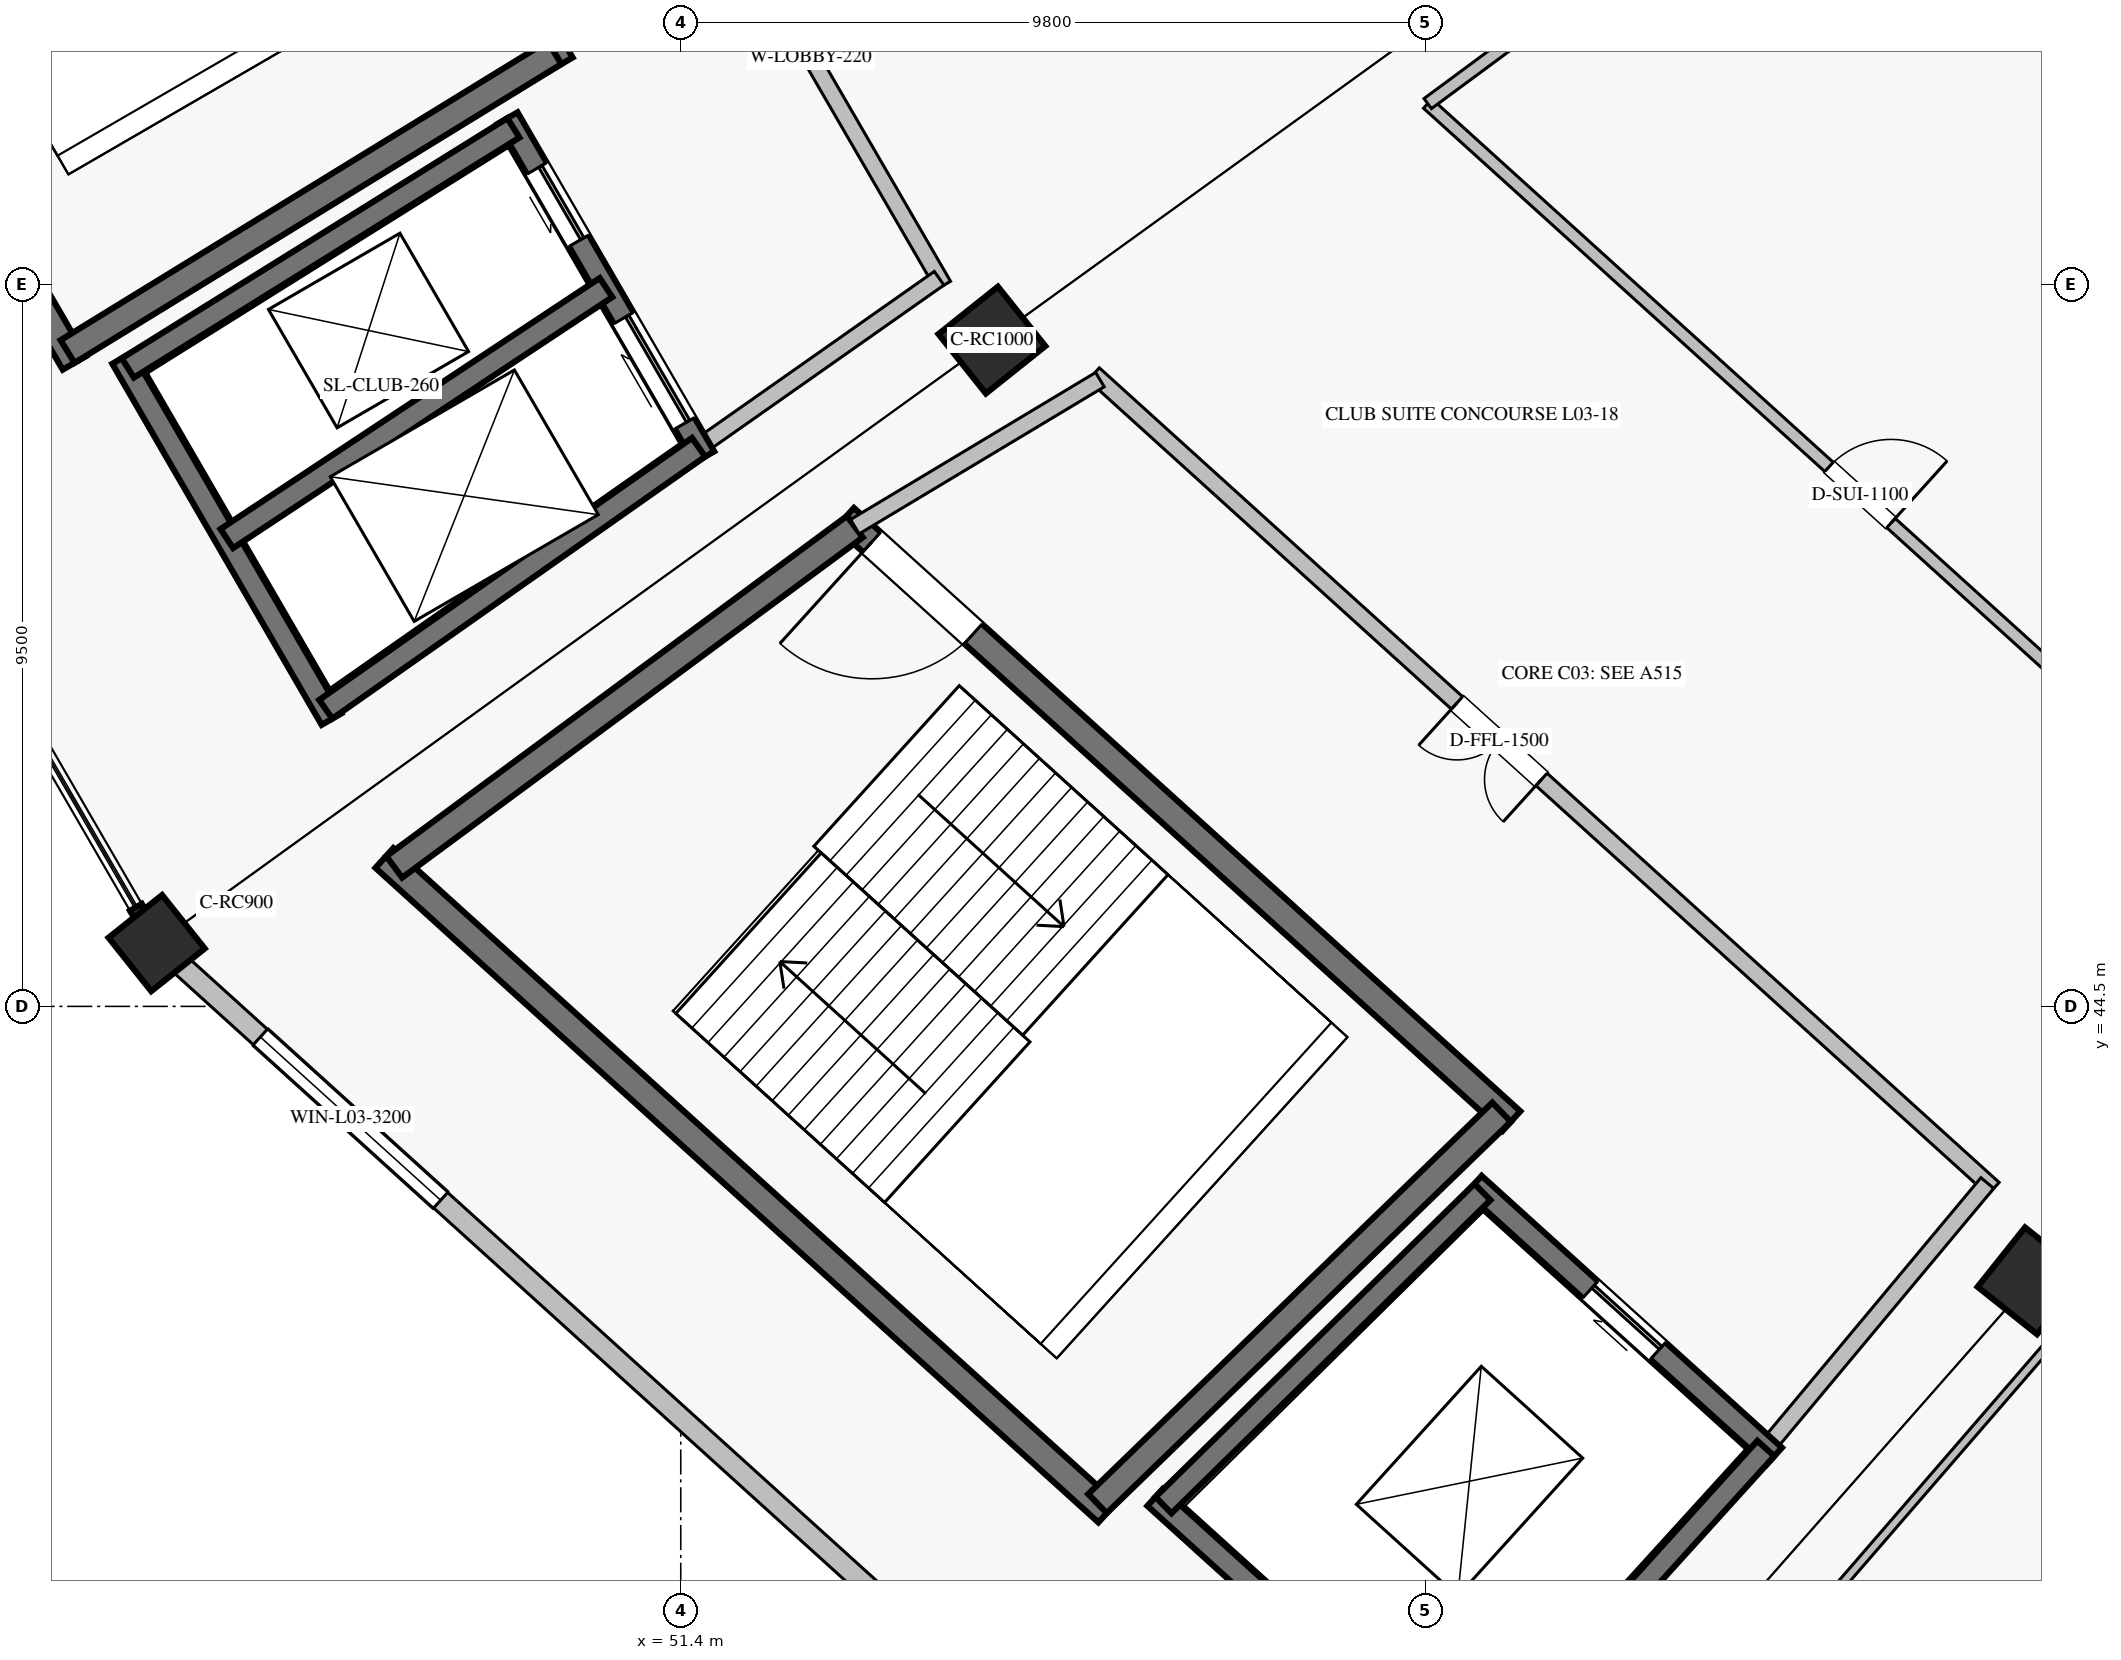
"""IFC4 building model, lengths in metres.
Left out: names, types, materials, properties, quantities, classifications, styles, units other than length and angle.
Written with IfcOpenShell. Run it as: python <this file> out.ifc"""

import sys

from ifc_helpers import new_model, si_unit, direction, frame, frame_2d, origin, origin_2d, place, context, subcontext, project, spatial, rectangle, extrude, element, fill, save


model = new_model("IFC4")
c1 = context("Model", 3, precision=1e-05, world=origin(), true_north=direction((0.0, 1.0)))
c2 = subcontext(c1, "Body", "Model", "MODEL_VIEW")
j1 = project(units=[si_unit("LENGTHUNIT", "METRE"), si_unit("PLANEANGLEUNIT", "RADIAN")], contexts=[c1])
p1 = place(None, origin())
s1 = spatial("IfcSite", under=j1, at=p1, CompositionType="ELEMENT")
p2 = place(p1, origin())
s2 = spatial("IfcBuilding", under=s1, at=p2, CompositionType="ELEMENT")
p3 = place(p2, frame((0.0, 0.0, 15.64)))
s3 = spatial("IfcBuildingStorey", under=s2, at=p3, CompositionType="ELEMENT", Elevation=15.64)
for number, where, z_axis, x_axis in (
    (1, (55.494, 53.266, 0.0), (0.0, 0.0, 1.0), (-0.782, -0.623, 0.0)),
    (2, (69.166, 40.889, 0.0), (0.0, 0.0, 1.0), (-0.623, -0.782, 0.0)),
):
    element("IfcColumn", number, at=place(p3, frame(where, z_axis=z_axis, x_axis=x_axis)), inside=s3, PredefinedType="COLUMN", context=c2, shape_type="SweptSolid", body=[
        extrude(rectangle(XDim=1.0, YDim=1.0, at=origin_2d()), origin(), (0.0, 0.0, 1.0), 4.76),
    ])
p4 = place(p3, frame((44.505, 45.332, 0.0), z_axis=(0.0, 0.0, 1.0), x_axis=(-0.781831482473, -0.623489801853, 0.0)))
e3 = element("IfcColumn", 3, at=p4, inside=s3, PredefinedType="COLUMN", context=c2, shape_type="SweptSolid", body=[
    extrude(rectangle(XDim=0.9, YDim=0.9, at=origin_2d()), origin(), (0.0, 0.0, 1.0), 4.76),
])
p5 = place(p3, frame((44.831, 45.037, 0.0), z_axis=(0.0, 0.0, 1.0), x_axis=(0.741352367697, -0.671115986183, 0.0)))
e4 = element("IfcWall", 4, at=p5, inside=s3, PredefinedType="SOLIDWALL", context=c2, shape_type="SweptSolid", body=[
    extrude(rectangle(XDim=20.564, YDim=0.275, at=frame_2d((10.282, 0.0))), origin(), (0.0, 0.0, 1.0), 3.81),
])
p6 = place(p5, frame((1.4, 0.0, 1.0)))
e5 = element("IfcOpeningElement", 5, at=p6, cuts=e4, PredefinedType="OPENING", context=c2, shape_type="SweptSolid", body=[
    extrude(rectangle(XDim=3.2, YDim=2.2, at=frame_2d((1.6, 1.1))), frame((0.0, 0.147, 0.0), z_axis=(0.0, -1.0, 0.0), x_axis=(1.0, 0.0, 0.0)), (0.0, 0.0, 1.0), 0.295),
])
p7 = place(p3, frame((44.09, 66.788, 0.0), z_axis=(0.0, 0.0, 1.0), x_axis=(0.501628624814, -0.865083072755, 0.0)))
e6 = element("IfcWall", 6, at=p7, inside=s3, PredefinedType="SHEAR", context=c2, shape_type="SweptSolid", body=[
    extrude(rectangle(XDim=11.435, YDim=0.35, at=frame_2d((5.718, 0.0))), origin(), (0.0, 0.0, 1.0), 4.46),
])
p8 = place(p7, frame((0.475, 0.0, 0.0)))
e7 = element("IfcOpeningElement", 7, at=p8, cuts=e6, PredefinedType="OPENING", context=c2, shape_type="SweptSolid", body=[
    extrude(rectangle(XDim=1.8, YDim=2.2, at=frame_2d((0.9, 1.1))), frame((0.0, 0.185, 0.0), z_axis=(0.0, -1.0, 0.0), x_axis=(1.0, 0.0, 0.0)), (0.0, 0.0, 1.0), 0.37),
])
p9 = place(p3, frame((37.198, 63.695, 0.0), z_axis=(0.0, 0.0, 1.0), x_axis=(0.501601740165, -0.865098661577, 0.0)))
e8 = element("IfcWall", 8, at=p9, inside=s3, PredefinedType="SHEAR", context=c2, shape_type="SweptSolid", body=[
    extrude(rectangle(XDim=12.405, YDim=0.35, at=frame_2d((6.202, 0.0))), origin(), (0.0, 0.0, 1.0), 4.46),
])
p10 = place(p3, frame((49.739, 57.046, 0.0), z_axis=(0.0, 0.0, 1.0), x_axis=(-0.852334575619, -0.522996913188, 0.0)))
e9 = element("IfcWall", 9, at=p10, inside=s3, PredefinedType="SHEAR", context=c2, shape_type="SweptSolid", body=[
    extrude(rectangle(XDim=7.516, YDim=0.35, at=frame_2d((3.758, 0.0))), origin(), (0.0, 0.0, 1.0), 4.46),
])
p11 = place(p3, frame((49.123, 56.188, 0.0), z_axis=(0.0, 0.0, 1.0), x_axis=(0.501629534056, -0.86508254552, 0.0)))
e10 = element("IfcWall", 10, at=p11, inside=s3, PredefinedType="SHEAR", context=c2, shape_type="SweptSolid", body=[
    extrude(rectangle(XDim=5.157, YDim=0.3, at=frame_2d((2.579, 0.0))), origin(), (0.0, 0.0, 1.0), 4.46),
])
p12 = place(p11, frame((0.766, 0.0, 0.0)))
e11 = element("IfcOpeningElement", 11, at=p12, cuts=e10, PredefinedType="OPENING", context=c2, shape_type="SweptSolid", body=[
    extrude(rectangle(XDim=1.1, YDim=2.2, at=frame_2d((0.55, 1.1))), frame((0.0, 0.16, 0.0), z_axis=(0.0, -1.0, 0.0), x_axis=(1.0, 0.0, 0.0)), (0.0, 0.0, 1.0), 0.32),
])
p13 = place(p11, frame((3.042, 0.0, 0.0)))
e12 = element("IfcOpeningElement", 12, at=p13, cuts=e10, PredefinedType="OPENING", context=c2, shape_type="SweptSolid", body=[
    extrude(rectangle(XDim=1.6, YDim=2.3, at=frame_2d((0.8, 1.15))), frame((0.0, 0.16, 0.0), z_axis=(0.0, -1.0, 0.0), x_axis=(1.0, 0.0, 0.0)), (0.0, 0.0, 1.0), 0.32),
])
p14 = place(p3, frame((44.05, 53.03, 0.0), z_axis=(0.0, 0.0, 1.0), x_axis=(0.501596987756, -0.865101417103, 0.0)))
e13 = element("IfcWall", 13, at=p14, inside=s3, PredefinedType="SHEAR", context=c2, shape_type="SweptSolid", body=[
    extrude(rectangle(XDim=5.491, YDim=0.3, at=frame_2d((2.746, 0.0))), origin(), (0.0, 0.0, 1.0), 4.46),
])
p15 = place(p3, frame((49.198, 56.058, 0.0), z_axis=(0.0, 0.0, 1.0), x_axis=(-0.848938067893, -0.528492343257, 0.0)))
e14 = element("IfcWall", 14, at=p15, inside=s3, PredefinedType="SHEAR", context=c2, shape_type="SweptSolid", body=[
    extrude(rectangle(XDim=5.975, YDim=0.3, at=frame_2d((2.988, 0.0))), origin(), (0.0, 0.0, 1.0), 4.46),
])
p16 = place(p3, frame((51.635, 51.855, 0.0), z_axis=(0.0, 0.0, 1.0), x_axis=(-0.818205158105, -0.574926359851, 0.0)))
e15 = element("IfcWall", 15, at=p16, inside=s3, PredefinedType="SHEAR", context=c2, shape_type="SweptSolid", body=[
    extrude(rectangle(XDim=5.995, YDim=0.3, at=frame_2d((2.998, 0.0))), origin(), (0.0, 0.0, 1.0), 4.46),
])
p17 = place(p3, frame((50.417, 53.957, 0.0), z_axis=(0.0, 0.0, 1.0), x_axis=(-0.833878900042, -0.551947443209, 0.0)))
e16 = element("IfcWall", 16, at=p17, inside=s3, PredefinedType="SHEAR", context=c2, shape_type="SweptSolid", body=[
    extrude(rectangle(XDim=5.983, YDim=0.3, at=frame_2d((2.991, 0.0))), origin(), (0.0, 0.0, 1.0), 4.46),
])
p18 = place(p3, frame((46.774, 67.921, 0.0), z_axis=(0.0, 0.0, 1.0), x_axis=(0.501612626242, -0.865092349518, 0.0)))
e17 = element("IfcWall", 17, at=p18, inside=s3, PredefinedType="SOLIDWALL", context=c2, shape_type="SweptSolid", body=[
    extrude(rectangle(XDim=16.11, YDim=0.22, at=frame_2d((8.055, 0.0))), origin(), (0.0, 0.0, 1.0), 4.46),
])
p19 = place(p18, frame((6.511, 0.0, 0.0)))
e18 = element("IfcOpeningElement", 18, at=p19, cuts=e17, PredefinedType="OPENING", context=c2, shape_type="SweptSolid", body=[
    extrude(rectangle(XDim=1.5, YDim=2.2, at=frame_2d((0.75, 1.1))), frame((0.0, 0.12, 0.0), z_axis=(0.0, -1.0, 0.0), x_axis=(1.0, 0.0, 0.0)), (0.0, 0.0, 1.0), 0.24),
])
p20 = place(p3, frame((54.8, 54.079, 0.0), z_axis=(0.0, 0.0, 1.0), x_axis=(-0.818225400643, -0.574897550649, 0.0)))
e19 = element("IfcWall", 19, at=p20, inside=s3, PredefinedType="SOLIDWALL", context=c2, shape_type="SweptSolid", body=[
    extrude(rectangle(XDim=3.868, YDim=0.22, at=frame_2d((1.934, 0.0))), origin(), (0.0, 0.0, 1.0), 4.46),
])
p21 = place(p3, frame((53.561, 50.928, 0.0), z_axis=(0.0, 0.0, 1.0), x_axis=(0.741358227035, -0.671109513572, 0.0)))
e20 = element("IfcWall", 20, at=p21, inside=s3, PredefinedType="SHEAR", context=c2, shape_type="SweptSolid", body=[
    extrude(rectangle(XDim=11.827, YDim=0.35, at=frame_2d((5.913, 0.0))), origin(), (0.0, 0.0, 1.0), 4.46),
])
p22 = place(p21, frame((0.475, 0.0, 0.0)))
e21 = element("IfcOpeningElement", 21, at=p22, cuts=e20, PredefinedType="OPENING", context=c2, shape_type="SweptSolid", body=[
    extrude(rectangle(XDim=1.8, YDim=2.2, at=frame_2d((0.9, 1.1))), frame((0.0, 0.185, 0.0), z_axis=(0.0, -1.0, 0.0), x_axis=(1.0, 0.0, 0.0)), (0.0, 0.0, 1.0), 0.37),
])
p23 = place(p3, frame((47.501, 46.452, 0.0), z_axis=(0.0, 0.0, 1.0), x_axis=(0.741351373721, -0.671117084183, 0.0)))
e22 = element("IfcWall", 22, at=p23, inside=s3, PredefinedType="SHEAR", context=c2, shape_type="SweptSolid", body=[
    extrude(rectangle(XDim=12.83, YDim=0.35, at=frame_2d((6.415, 0.0))), origin(), (0.0, 0.0, 1.0), 4.46),
])
p24 = place(p3, frame((53.691, 50.811, 0.0), z_axis=(0.0, 0.0, 1.0), x_axis=(-0.804395625347, -0.594093997548, 0.0)))
e23 = element("IfcWall", 23, at=p24, inside=s3, PredefinedType="SHEAR", context=c2, shape_type="SweptSolid", body=[
    extrude(rectangle(XDim=7.534, YDim=0.35, at=frame_2d((3.767, 0.0))), origin(), (0.0, 0.0, 1.0), 4.46),
])
p25 = place(p3, frame((62.199, 43.108, 0.0), z_axis=(0.0, 0.0, 1.0), x_axis=(-0.718297398554, -0.69573619083, 0.0)))
e24 = element("IfcWall", 24, at=p25, inside=s3, PredefinedType="SHEAR", context=c2, shape_type="SweptSolid", body=[
    extrude(rectangle(XDim=7.402, YDim=0.35, at=frame_2d((3.701, 0.0))), origin(), (0.0, 0.0, 1.0), 4.46),
])
p26 = place(p3, frame((61.837, 42.159, 0.0), z_axis=(0.0, 0.0, 1.0), x_axis=(0.741350155641, -0.671118429736, 0.0)))
e25 = element("IfcWall", 25, at=p26, inside=s3, PredefinedType="SHEAR", context=c2, shape_type="SweptSolid", body=[
    extrude(rectangle(XDim=5.329, YDim=0.3, at=frame_2d((2.665, 0.0))), origin(), (0.0, 0.0, 1.0), 4.46),
])
p27 = place(p26, frame((2.065, 0.0, 0.0)))
e26 = element("IfcOpeningElement", 26, at=p27, cuts=e25, PredefinedType="OPENING", context=c2, shape_type="SweptSolid", body=[
    extrude(rectangle(XDim=1.2, YDim=2.2, at=frame_2d((0.6, 1.1))), frame((0.0, 0.16, 0.0), z_axis=(0.0, -1.0, 0.0), x_axis=(1.0, 0.0, 0.0)), (0.0, 0.0, 1.0), 0.32),
])
p28 = place(p3, frame((57.64, 38.039, 0.0), z_axis=(0.0, 0.0, 1.0), x_axis=(0.74134208775, -0.671127341815, 0.0)))
e27 = element("IfcWall", 27, at=p28, inside=s3, PredefinedType="SHEAR", context=c2, shape_type="SweptSolid", body=[
    extrude(rectangle(XDim=5.675, YDim=0.3, at=frame_2d((2.837, 0.0))), origin(), (0.0, 0.0, 1.0), 4.46),
])
p29 = place(p3, frame((61.948, 42.059, 0.0), z_axis=(0.0, 0.0, 1.0), x_axis=(-0.713553028001, -0.700601224828, 0.0)))
e28 = element("IfcWall", 28, at=p29, inside=s3, PredefinedType="SHEAR", context=c2, shape_type="SweptSolid", body=[
    extrude(rectangle(XDim=5.881, YDim=0.3, at=frame_2d((2.94, 0.0))), origin(), (0.0, 0.0, 1.0), 4.46),
])
p30 = place(p3, frame((65.676, 38.684, 0.0), z_axis=(0.0, 0.0, 1.0), x_axis=(-0.67115829282, -0.741314067031, 0.0)))
e29 = element("IfcWall", 29, at=p30, inside=s3, PredefinedType="SHEAR", context=c2, shape_type="SweptSolid", body=[
    extrude(rectangle(XDim=5.871, YDim=0.3, at=frame_2d((2.935, 0.0))), origin(), (0.0, 0.0, 1.0), 4.46),
])
p31 = place(p3, frame((56.834, 52.819, 0.0), z_axis=(0.0, 0.0, 1.0), x_axis=(0.741351035574, -0.671117457717, 0.0)))
e30 = element("IfcWall", 30, at=p31, inside=s3, PredefinedType="SOLIDWALL", context=c2, shape_type="SweptSolid", body=[
    extrude(rectangle(XDim=15.969, YDim=0.22, at=frame_2d((7.985, 0.0))), origin(), (0.0, 0.0, 1.0), 4.46),
])
p32 = place(p31, frame((6.447, 0.0, 0.0)))
e31 = element("IfcOpeningElement", 31, at=p32, cuts=e30, PredefinedType="OPENING", context=c2, shape_type="SweptSolid", body=[
    extrude(rectangle(XDim=1.5, YDim=2.2, at=frame_2d((0.75, 1.1))), frame((0.0, 0.12, 0.0), z_axis=(0.0, -1.0, 0.0), x_axis=(1.0, 0.0, 0.0)), (0.0, 0.0, 1.0), 0.24),
])
p33 = place(p3, frame((56.915, 52.746, 0.0), z_axis=(0.0, 0.0, 1.0), x_axis=(-0.857424171966, -0.514610327654, 0.0)))
e32 = element("IfcWall", 32, at=p33, inside=s3, PredefinedType="SOLIDWALL", context=c2, shape_type="SweptSolid", body=[
    extrude(rectangle(XDim=3.76, YDim=0.22, at=frame_2d((1.88, 0.0))), origin(), (0.0, 0.0, 1.0), 4.46),
])
p34 = place(p3, frame((68.591, 42.176, 0.0), z_axis=(0.0, 0.0, 1.0), x_axis=(-0.640759627034, -0.767741558315, 0.0)))
e33 = element("IfcWall", 33, at=p34, inside=s3, PredefinedType="SOLIDWALL", context=c2, shape_type="SweptSolid", body=[
    extrude(rectangle(XDim=4.549, YDim=0.22, at=frame_2d((2.274, 0.0))), origin(), (0.0, 0.0, 1.0), 4.46),
])
p35 = place(p3, frame((69.599, 40.28, 0.0), z_axis=(0.0, 0.0, 1.0), x_axis=(-0.654293035882, -0.756241114458, 0.0)))
e34 = element("IfcWall", 34, at=p35, inside=s3, PredefinedType="PARTITIONING", context=c2, shape_type="SweptSolid", body=[
    extrude(rectangle(XDim=12.091, YDim=0.115, at=frame_2d((6.045, 0.0))), origin(), (0.0, 0.0, 1.0), 3.78),
])
p36 = place(p3, frame((75.326, 37.559, 0.0), z_axis=(0.0, 0.0, 1.0), x_axis=(-0.594760374645, -0.803903039397, 0.0)))
e35 = element("IfcWall", 35, at=p36, inside=s3, PredefinedType="PARTITIONING", context=c2, shape_type="SweptSolid", body=[
    extrude(rectangle(XDim=11.875, YDim=0.1, at=frame_2d((5.938, 0.0))), origin(), (0.0, 0.0, 1.0), 3.78),
])
p37 = place(p3, frame((61.228, 56.377, 0.0), z_axis=(0.0, 0.0, 1.0), x_axis=(0.741351792112, -0.671116622006, 0.0)))
e36 = element("IfcWall", 36, at=p37, inside=s3, PredefinedType="PARTITIONING", context=c2, shape_type="SweptSolid", body=[
    extrude(rectangle(XDim=15.343, YDim=0.165, at=frame_2d((7.672, 0.0))), origin(), (0.0, 0.0, 1.0), 3.78),
])
p38 = place(p37, frame((7.122, 0.0, 0.0)))
e37 = element("IfcOpeningElement", 37, at=p38, cuts=e36, PredefinedType="OPENING", context=c2, shape_type="SweptSolid", body=[
    extrude(rectangle(XDim=1.1, YDim=2.25, at=frame_2d((0.55, 1.125))), frame((0.0, 0.093, 0.0), z_axis=(0.0, -1.0, 0.0), x_axis=(1.0, 0.0, 0.0)), (0.0, 0.0, 1.0), 0.185),
])
p39 = place(p3, frame((61.228, 56.377, 0.0), z_axis=(0.0, 0.0, 1.0), x_axis=(0.804403413526, 0.594083452309, 0.0)))
e38 = element("IfcWall", 38, at=p39, inside=s3, PredefinedType="PARTITIONING", context=c2, shape_type="SweptSolid", body=[
    extrude(rectangle(XDim=5.892, YDim=0.165, at=frame_2d((2.946, 0.0))), origin(), (0.0, 0.0, 1.0), 3.78),
])
p40 = place(p6, origin())
e39 = element("IfcWindow", 39, at=p40, inside=s3, PartitioningType="SINGLE_PANEL", PredefinedType="WINDOW", context=c2, shape_type="SweptSolid", body=[
    extrude(rectangle(XDim=3.2, YDim=2.2, at=frame_2d((1.6, 1.1))), frame((0.0, 0.03, 0.0), z_axis=(0.0, -1.0, 0.0), x_axis=(1.0, 0.0, 0.0)), (0.0, 0.0, 1.0), 0.06),
])
fill(e5, e39)
p41 = place(p12, origin())
e40 = element("IfcDoor", 40, at=p41, inside=s3, OperationType="SLIDING_TO_RIGHT", PredefinedType="DOOR", context=c2, shape_type="SweptSolid", body=[
    extrude(rectangle(XDim=1.1, YDim=2.2, at=frame_2d((0.55, 1.1))), frame((0.0, 0.025, 0.0), z_axis=(0.0, -1.0, 0.0), x_axis=(1.0, 0.0, 0.0)), (0.0, 0.0, 1.0), 0.05),
])
fill(e11, e40)
p42 = place(p13, origin())
e41 = element("IfcDoor", 41, at=p42, inside=s3, OperationType="SLIDING_TO_LEFT", PredefinedType="DOOR", context=c2, shape_type="SweptSolid", body=[
    extrude(rectangle(XDim=1.6, YDim=2.3, at=frame_2d((0.8, 1.15))), frame((0.0, 0.025, 0.0), z_axis=(0.0, -1.0, 0.0), x_axis=(1.0, 0.0, 0.0)), (0.0, 0.0, 1.0), 0.05),
])
fill(e12, e41)
p43 = place(p22, frame((1.8, 0.0, 0.0), z_axis=(0.0, 0.0, 1.0), x_axis=(-1.0, 0.0, 0.0)))
e42 = element("IfcDoor", 42, at=p43, inside=s3, OperationType="SINGLE_SWING_RIGHT", PredefinedType="DOOR", context=c2, shape_type="SweptSolid", body=[
    extrude(rectangle(XDim=1.8, YDim=2.2, at=frame_2d((0.9, 1.1))), frame((0.0, 0.025, 0.0), z_axis=(0.0, -1.0, 0.0), x_axis=(1.0, 0.0, 0.0)), (0.0, 0.0, 1.0), 0.05),
])
fill(e21, e42)
p44 = place(p27, origin())
e43 = element("IfcDoor", 43, at=p44, inside=s3, OperationType="SLIDING_TO_LEFT", PredefinedType="DOOR", context=c2, shape_type="SweptSolid", body=[
    extrude(rectangle(XDim=1.2, YDim=2.2, at=frame_2d((0.6, 1.1))), frame((0.0, 0.025, 0.0), z_axis=(0.0, -1.0, 0.0), x_axis=(1.0, 0.0, 0.0)), (0.0, 0.0, 1.0), 0.05),
])
fill(e26, e43)
p45 = place(p32, frame((1.5, 0.0, 0.0), z_axis=(0.0, 0.0, 1.0), x_axis=(-1.0, 0.0, 0.0)))
e44 = element("IfcDoor", 44, at=p45, inside=s3, OperationType="DOUBLE_DOOR_SINGLE_SWING", PredefinedType="DOOR", context=c2, shape_type="SweptSolid", body=[
    extrude(rectangle(XDim=1.5, YDim=2.2, at=frame_2d((0.75, 1.1))), frame((0.0, 0.025, 0.0), z_axis=(0.0, -1.0, 0.0), x_axis=(1.0, 0.0, 0.0)), (0.0, 0.0, 1.0), 0.05),
])
fill(e31, e44)
p46 = place(p38, origin())
e45 = element("IfcDoor", 45, at=p46, inside=s3, OperationType="SINGLE_SWING_RIGHT", PredefinedType="DOOR", context=c2, shape_type="SweptSolid", body=[
    extrude(rectangle(XDim=1.1, YDim=2.25, at=frame_2d((0.55, 1.125))), frame((0.0, 0.025, 0.0), z_axis=(0.0, -1.0, 0.0), x_axis=(1.0, 0.0, 0.0)), (0.0, 0.0, 1.0), 0.05),
])
fill(e37, e45)
save(model, sys.argv[1])
